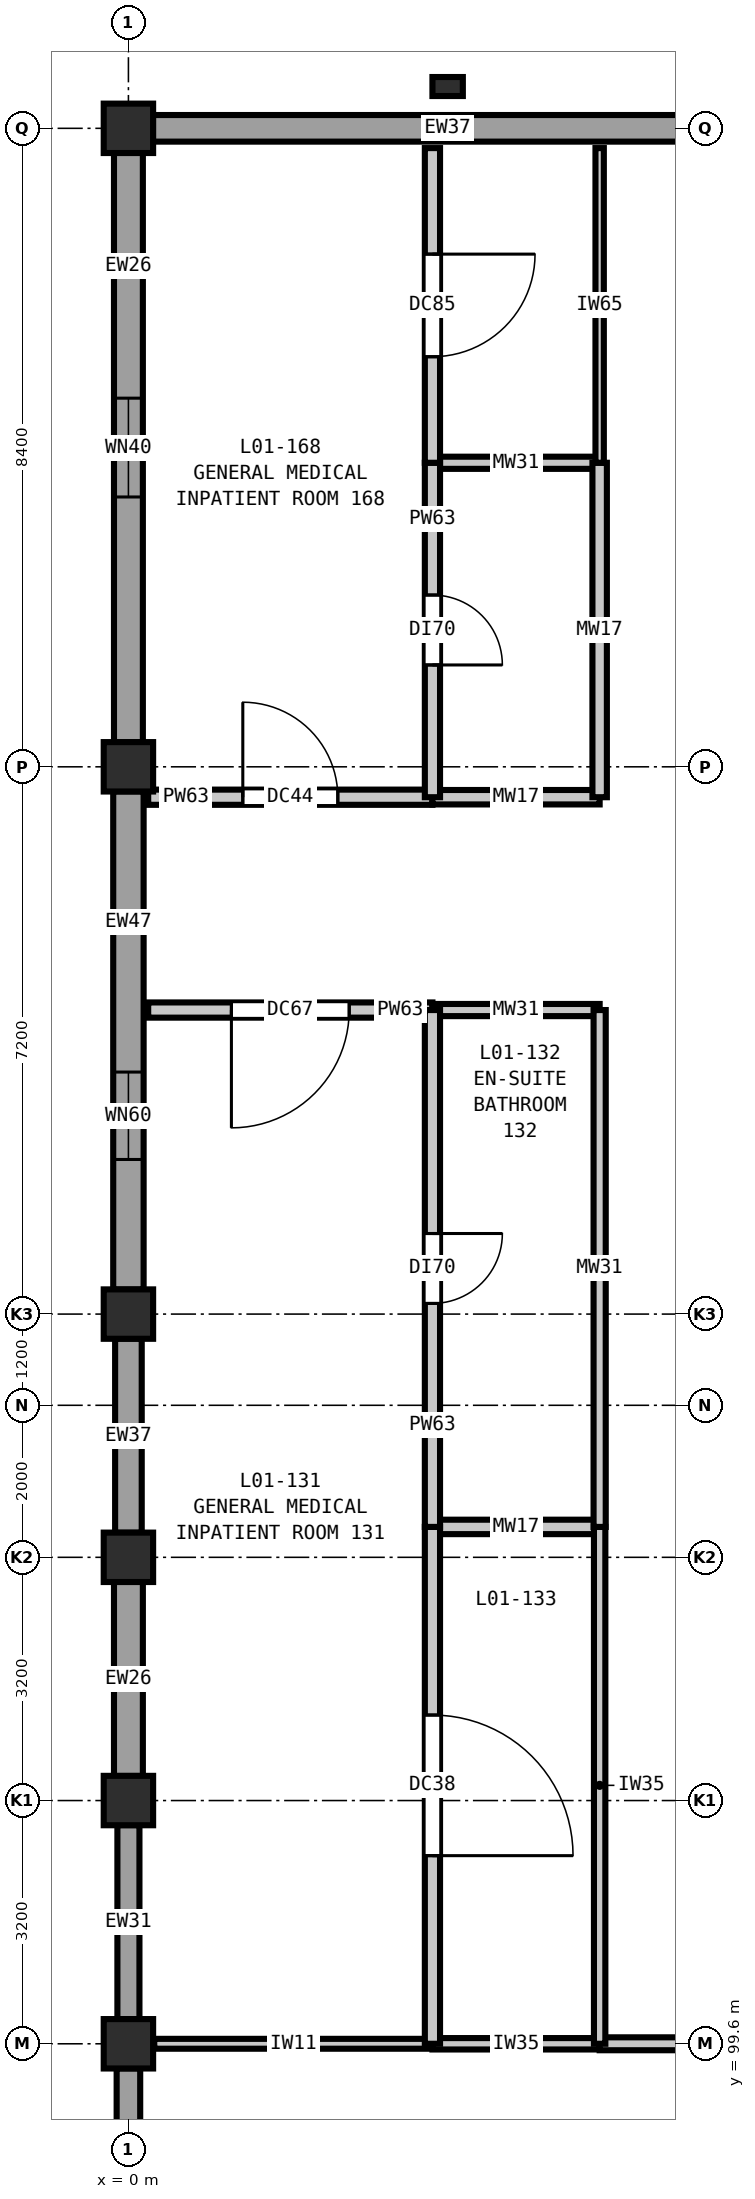
"""IFC4 building model, lengths in metres.
Left out: names, types, materials, properties, quantities, classifications, styles, units other than length and angle.
Written with IfcOpenShell. Run it as: python <this file> out.ifc"""

import sys

from ifc_helpers import new_model, si_unit, direction, frame, frame_2d, origin, origin_2d, place, context, subcontext, project, spatial, rectangle, extrude, element, fill, save


model = new_model("IFC4")
c1 = context("Model", 3, precision=1e-05, world=origin(), true_north=direction((0.0, 1.0)))
c2 = subcontext(c1, "Body", "Model", "MODEL_VIEW")
j1 = project(units=[si_unit("LENGTHUNIT", "METRE"), si_unit("PLANEANGLEUNIT", "RADIAN")], contexts=[c1])
p1 = place(None, origin())
s1 = spatial("IfcSite", under=j1, at=p1, CompositionType="ELEMENT")
p2 = place(p1, origin())
s2 = spatial("IfcBuilding", under=s1, at=p2, CompositionType="ELEMENT")
p3 = place(p2, frame((0.0, 0.0, 5.4)))
s3 = spatial("IfcBuildingStorey", under=s2, at=p3, CompositionType="ELEMENT", Elevation=5.4)
for number, where, z_axis, x_axis in (
    (1, (0.0, 99.6, 0.0), (0.0, 0.0, 1.0), (1.0, 0.0, 0.0)),
    (2, (0.0, 102.8, 0.0), (0.0, 0.0, 1.0), (1.0, 0.0, 0.0)),
    (3, (0.0, 106.0, 0.0), (0.0, 0.0, 1.0), (1.0, 0.0, 0.0)),
    (4, (0.0, 109.2, 0.0), (0.0, 0.0, 1.0), (1.0, 0.0, 0.0)),
    (5, (0.0, 116.4, 0.0), (0.0, 0.0, 1.0), (1.0, 0.0, 0.0)),
    (6, (0.0, 124.8, 0.0), (0.0, 0.0, 1.0), (1.0, 0.0, 0.0)),
):
    element("IfcColumn", number, at=place(p3, frame(where, z_axis=z_axis, x_axis=x_axis)), inside=s3, PredefinedType="COLUMN", context=c2, shape_type="SweptSolid", body=[
        extrude(rectangle(XDim=0.65, YDim=0.65, at=origin_2d()), origin(), (0.0, 0.0, 1.0), 5.4),
    ])
p4 = place(p3, frame((4.2, 125.35, 0.0), z_axis=(0.0, 0.0, 1.0), x_axis=(1.0, 0.0, 0.0)))
e7 = element("IfcColumn", 7, at=p4, inside=s3, PredefinedType="PILASTER", context=c2, shape_type="SweptSolid", body=[
    extrude(rectangle(XDim=0.4, YDim=0.25, at=origin_2d()), origin(), (0.0, 0.0, 1.0), 5.4),
])
p5 = place(p3, frame((0.0, 91.523, 0.0), z_axis=(0.0, 0.0, 1.0), x_axis=(0.0, 1.0, 0.0)))
e8 = element("IfcWall", 8, at=p5, inside=s3, PredefinedType="SOLIDWALL", context=c2, shape_type="SweptSolid", body=[
    extrude(rectangle(XDim=7.754, YDim=0.31, at=frame_2d((3.877, 0.0))), origin(), (0.0, 0.0, 1.0), 4.68),
])
p6 = place(p5, frame((2.089, 0.0, 0.9)))
e9 = element("IfcOpeningElement", 9, at=p6, cuts=e8, PredefinedType="OPENING", context=c2, shape_type="SweptSolid", body=[
    extrude(rectangle(XDim=1.0, YDim=1.75, at=frame_2d((0.5, 0.875))), frame((0.0, 0.165, 0.0), z_axis=(0.0, -1.0, 0.0), x_axis=(1.0, 0.0, 0.0)), (0.0, 0.0, 1.0), 0.33),
])
p7 = place(p3, frame((0.0, 99.923, 0.0), z_axis=(0.0, 0.0, 1.0), x_axis=(0.0, 1.0, 0.0)))
e10 = element("IfcWall", 10, at=p7, inside=s3, PredefinedType="SOLIDWALL", context=c2, shape_type="SweptSolid", body=[
    extrude(rectangle(XDim=2.554, YDim=0.29, at=frame_2d((1.277, 0.0))), origin(), (0.0, 0.0, 1.0), 4.68),
])
p8 = place(p3, frame((0.0, 103.123, 0.0), z_axis=(0.0, 0.0, 1.0), x_axis=(0.0, 1.0, 0.0)))
e11 = element("IfcWall", 11, at=p8, inside=s3, PredefinedType="SOLIDWALL", context=c2, shape_type="SweptSolid", body=[
    extrude(rectangle(XDim=2.554, YDim=0.38, at=frame_2d((1.277, 0.0))), origin(), (0.0, 0.0, 1.0), 4.68),
])
p9 = place(p3, frame((0.0, 106.323, 0.0), z_axis=(0.0, 0.0, 1.0), x_axis=(0.0, 1.0, 0.0)))
e12 = element("IfcWall", 12, at=p9, inside=s3, PredefinedType="SOLIDWALL", context=c2, shape_type="SweptSolid", body=[
    extrude(rectangle(XDim=2.554, YDim=0.35, at=frame_2d((1.277, 0.0))), origin(), (0.0, 0.0, 1.0), 4.68),
])
p10 = place(p3, frame((0.0, 109.523, 0.0), z_axis=(0.0, 0.0, 1.0), x_axis=(0.0, 1.0, 0.0)))
e13 = element("IfcWall", 13, at=p10, inside=s3, PredefinedType="SOLIDWALL", context=c2, shape_type="SweptSolid", body=[
    extrude(rectangle(XDim=6.554, YDim=0.4, at=frame_2d((3.277, 0.0))), origin(), (0.0, 0.0, 1.0), 4.68),
])
p11 = place(p10, frame((1.711, 0.0, 0.9)))
e14 = element("IfcOpeningElement", 14, at=p11, cuts=e13, PredefinedType="OPENING", context=c2, shape_type="SweptSolid", body=[
    extrude(rectangle(XDim=1.15, YDim=1.75, at=frame_2d((0.575, 0.875))), frame((0.0, 0.21, 0.0), z_axis=(0.0, -1.0, 0.0), x_axis=(1.0, 0.0, 0.0)), (0.0, 0.0, 1.0), 0.42),
])
p12 = place(p3, frame((0.0, 116.723, 0.0), z_axis=(0.0, 0.0, 1.0), x_axis=(0.0, 1.0, 0.0)))
e15 = element("IfcWall", 15, at=p12, inside=s3, PredefinedType="SOLIDWALL", context=c2, shape_type="SweptSolid", body=[
    extrude(rectangle(XDim=7.754, YDim=0.38, at=frame_2d((3.877, 0.0))), origin(), (0.0, 0.0, 1.0), 4.68),
])
p13 = place(p12, frame((3.227, 0.0, 0.9)))
e16 = element("IfcOpeningElement", 16, at=p13, cuts=e15, PredefinedType="OPENING", context=c2, shape_type="SweptSolid", body=[
    extrude(rectangle(XDim=1.3, YDim=1.75, at=frame_2d((0.65, 0.875))), frame((0.0, 0.2, 0.0), z_axis=(0.0, -1.0, 0.0), x_axis=(1.0, 0.0, 0.0)), (0.0, 0.0, 1.0), 0.4),
])
p14 = place(p3, frame((0.323, 124.8, 0.0), z_axis=(0.0, 0.0, 1.0), x_axis=(1.0, 0.0, 0.0)))
e17 = element("IfcWall", 17, at=p14, inside=s3, PredefinedType="SOLIDWALL", context=c2, shape_type="SweptSolid", body=[
    extrude(rectangle(XDim=7.754, YDim=0.35, at=frame_2d((3.877, 0.0))), origin(), (0.0, 0.0, 1.0), 4.68),
])
p15 = place(p3, frame((0.34, 99.6, 0.0), z_axis=(0.0, 0.0, 1.0), x_axis=(1.0, 0.0, 0.0)))
e18 = element("IfcWall", 18, at=p15, inside=s3, PredefinedType="PARTITIONING", context=c2, shape_type="SweptSolid", body=[
    extrude(rectangle(XDim=3.66, YDim=0.13, at=frame_2d((1.83, 0.0))), origin(), (0.0, 0.0, 1.0), 4.685),
])
p16 = place(p3, frame((4.0, 99.6, 0.0), z_axis=(0.0, 0.0, 1.0), x_axis=(1.0, 0.0, 0.0)))
e19 = element("IfcWall", 19, at=p16, inside=s3, PredefinedType="PARTITIONING", context=c2, shape_type="SweptSolid", body=[
    extrude(rectangle(XDim=2.2, YDim=0.15, at=frame_2d((1.1, 0.0))), origin(), (0.0, 0.0, 1.0), 4.685),
])
p17 = place(p3, frame((6.2, 99.6, 0.0), z_axis=(0.0, 0.0, 1.0), x_axis=(1.0, 0.0, 0.0)))
e20 = element("IfcWall", 20, at=p17, inside=s3, PredefinedType="PARTITIONING", context=c2, shape_type="SweptSolid", body=[
    extrude(rectangle(XDim=1.86, YDim=0.17, at=frame_2d((0.93, 0.0))), origin(), (0.0, 0.0, 1.0), 4.685),
])
p18 = place(p3, frame((4.0, 106.4, 0.0), z_axis=(0.0, 0.0, 1.0), x_axis=(1.0, 0.0, 0.0)))
e21 = element("IfcWall", 21, at=p18, inside=s3, PredefinedType="PLUMBINGWALL", context=c2, shape_type="SweptSolid", body=[
    extrude(rectangle(XDim=2.2, YDim=0.19, at=frame_2d((1.1, 0.0))), origin(), (0.0, 0.0, 1.0), 5.05),
])
p19 = place(p3, frame((0.26, 113.2, 0.0), z_axis=(0.0, 0.0, 1.0), x_axis=(1.0, 0.0, 0.0)))
e22 = element("IfcWall", 22, at=p19, inside=s3, PredefinedType="PARTITIONING", context=c2, shape_type="SweptSolid", body=[
    extrude(rectangle(XDim=3.74, YDim=0.2, at=frame_2d((1.87, 0.0))), origin(), (0.0, 0.0, 1.0), 5.05),
])
p20 = place(p19, frame((1.095, 0.0, 0.0)))
e23 = element("IfcOpeningElement", 23, at=p20, cuts=e22, PredefinedType="OPENING", context=c2, shape_type="SweptSolid", body=[
    extrude(rectangle(XDim=1.55, YDim=2.25, at=frame_2d((0.775, 1.125))), frame((0.0, 0.11, 0.0), z_axis=(0.0, -1.0, 0.0), x_axis=(1.0, 0.0, 0.0)), (0.0, 0.0, 1.0), 0.22),
])
p21 = place(p3, frame((4.0, 113.2, 0.0), z_axis=(0.0, 0.0, 1.0), x_axis=(1.0, 0.0, 0.0)))
e24 = element("IfcWall", 24, at=p21, inside=s3, PredefinedType="PLUMBINGWALL", context=c2, shape_type="SweptSolid", body=[
    extrude(rectangle(XDim=2.2, YDim=0.16, at=frame_2d((1.1, 0.0))), origin(), (0.0, 0.0, 1.0), 5.05),
])
p22 = place(p3, frame((0.26, 116.0, 0.0), z_axis=(0.0, 0.0, 1.0), x_axis=(1.0, 0.0, 0.0)))
e25 = element("IfcWall", 25, at=p22, inside=s3, PredefinedType="PARTITIONING", context=c2, shape_type="SweptSolid", body=[
    extrude(rectangle(XDim=3.74, YDim=0.2, at=frame_2d((1.87, 0.0))), origin(), (0.0, 0.0, 1.0), 5.05),
])
p23 = place(p22, frame((1.245, 0.0, 0.0)))
e26 = element("IfcOpeningElement", 26, at=p23, cuts=e25, PredefinedType="OPENING", context=c2, shape_type="SweptSolid", body=[
    extrude(rectangle(XDim=1.25, YDim=2.15, at=frame_2d((0.625, 1.075))), frame((0.0, 0.11, 0.0), z_axis=(0.0, -1.0, 0.0), x_axis=(1.0, 0.0, 0.0)), (0.0, 0.0, 1.0), 0.22),
])
p24 = place(p3, frame((4.0, 116.0, 0.0), z_axis=(0.0, 0.0, 1.0), x_axis=(1.0, 0.0, 0.0)))
e27 = element("IfcWall", 27, at=p24, inside=s3, PredefinedType="PLUMBINGWALL", context=c2, shape_type="SweptSolid", body=[
    extrude(rectangle(XDim=2.2, YDim=0.19, at=frame_2d((1.1, 0.0))), origin(), (0.0, 0.0, 1.0), 5.05),
])
p25 = place(p3, frame((4.0, 120.4, 0.0), z_axis=(0.0, 0.0, 1.0), x_axis=(1.0, 0.0, 0.0)))
e28 = element("IfcWall", 28, at=p25, inside=s3, PredefinedType="PLUMBINGWALL", context=c2, shape_type="SweptSolid", body=[
    extrude(rectangle(XDim=2.2, YDim=0.16, at=frame_2d((1.1, 0.0))), origin(), (0.0, 0.0, 1.0), 5.05),
])
p26 = place(p3, frame((4.0, 99.6, 0.0), z_axis=(0.0, 0.0, 1.0), x_axis=(0.0, 1.0, 0.0)))
e29 = element("IfcWall", 29, at=p26, inside=s3, PredefinedType="PARTITIONING", context=c2, shape_type="SweptSolid", body=[
    extrude(rectangle(XDim=6.8, YDim=0.2, at=frame_2d((3.4, 0.0))), origin(), (0.0, 0.0, 1.0), 5.05),
])
p27 = place(p26, frame((2.475, 0.0, 0.0)))
e30 = element("IfcOpeningElement", 30, at=p27, cuts=e29, PredefinedType="OPENING", context=c2, shape_type="SweptSolid", body=[
    extrude(rectangle(XDim=1.85, YDim=2.3, at=frame_2d((0.925, 1.15))), frame((0.0, 0.11, 0.0), z_axis=(0.0, -1.0, 0.0), x_axis=(1.0, 0.0, 0.0)), (0.0, 0.0, 1.0), 0.22),
])
p28 = place(p3, frame((4.0, 106.4, 0.0), z_axis=(0.0, 0.0, 1.0), x_axis=(0.0, 1.0, 0.0)))
e31 = element("IfcWall", 31, at=p28, inside=s3, PredefinedType="PARTITIONING", context=c2, shape_type="SweptSolid", body=[
    extrude(rectangle(XDim=6.8, YDim=0.2, at=frame_2d((3.4, 0.0))), origin(), (0.0, 0.0, 1.0), 5.05),
])
p29 = place(p28, frame((2.94, 0.0, 0.0)))
e32 = element("IfcOpeningElement", 32, at=p29, cuts=e31, PredefinedType="OPENING", context=c2, shape_type="SweptSolid", body=[
    extrude(rectangle(XDim=0.92, YDim=2.1, at=frame_2d((0.46, 1.05))), frame((0.0, 0.11, 0.0), z_axis=(0.0, -1.0, 0.0), x_axis=(1.0, 0.0, 0.0)), (0.0, 0.0, 1.0), 0.22),
])
p30 = place(p3, frame((4.0, 116.0, 0.0), z_axis=(0.0, 0.0, 1.0), x_axis=(0.0, 1.0, 0.0)))
e33 = element("IfcWall", 33, at=p30, inside=s3, PredefinedType="PARTITIONING", context=c2, shape_type="SweptSolid", body=[
    extrude(rectangle(XDim=4.4, YDim=0.2, at=frame_2d((2.2, 0.0))), origin(), (0.0, 0.0, 1.0), 5.05),
])
p31 = place(p30, frame((1.74, 0.0, 0.0)))
e34 = element("IfcOpeningElement", 34, at=p31, cuts=e33, PredefinedType="OPENING", context=c2, shape_type="SweptSolid", body=[
    extrude(rectangle(XDim=0.92, YDim=2.1, at=frame_2d((0.46, 1.05))), frame((0.0, 0.11, 0.0), z_axis=(0.0, -1.0, 0.0), x_axis=(1.0, 0.0, 0.0)), (0.0, 0.0, 1.0), 0.22),
])
p32 = place(p3, frame((4.0, 120.4, 0.0), z_axis=(0.0, 0.0, 1.0), x_axis=(0.0, 1.0, 0.0)))
e35 = element("IfcWall", 35, at=p32, inside=s3, PredefinedType="PARTITIONING", context=c2, shape_type="SweptSolid", body=[
    extrude(rectangle(XDim=4.14, YDim=0.2, at=frame_2d((2.07, 0.0))), origin(), (0.0, 0.0, 1.0), 5.05),
])
p33 = place(p32, frame((1.395, 0.0, 0.0)))
e36 = element("IfcOpeningElement", 36, at=p33, cuts=e35, PredefinedType="OPENING", context=c2, shape_type="SweptSolid", body=[
    extrude(rectangle(XDim=1.35, YDim=2.2, at=frame_2d((0.675, 1.1))), frame((0.0, 0.11, 0.0), z_axis=(0.0, -1.0, 0.0), x_axis=(1.0, 0.0, 0.0)), (0.0, 0.0, 1.0), 0.22),
])
p34 = place(p3, frame((6.2, 99.6, 0.0), z_axis=(0.0, 0.0, 1.0), x_axis=(0.0, 1.0, 0.0)))
e37 = element("IfcWall", 37, at=p34, inside=s3, PredefinedType="PARTITIONING", context=c2, shape_type="SweptSolid", body=[
    extrude(rectangle(XDim=6.8, YDim=0.15, at=frame_2d((3.4, 0.0))), origin(), (0.0, 0.0, 1.0), 5.05),
])
p35 = place(p3, frame((6.2, 106.4, 0.0), z_axis=(0.0, 0.0, 1.0), x_axis=(0.0, 1.0, 0.0)))
e38 = element("IfcWall", 38, at=p35, inside=s3, PredefinedType="PLUMBINGWALL", context=c2, shape_type="SweptSolid", body=[
    extrude(rectangle(XDim=6.8, YDim=0.16, at=frame_2d((3.4, 0.0))), origin(), (0.0, 0.0, 1.0), 5.05),
])
p36 = place(p3, frame((6.2, 116.0, 0.0), z_axis=(0.0, 0.0, 1.0), x_axis=(0.0, 1.0, 0.0)))
e39 = element("IfcWall", 39, at=p36, inside=s3, PredefinedType="PLUMBINGWALL", context=c2, shape_type="SweptSolid", body=[
    extrude(rectangle(XDim=4.4, YDim=0.19, at=frame_2d((2.2, 0.0))), origin(), (0.0, 0.0, 1.0), 5.05),
])
p37 = place(p3, frame((6.2, 120.4, 0.0), z_axis=(0.0, 0.0, 1.0), x_axis=(0.0, 1.0, 0.0)))
e40 = element("IfcWall", 40, at=p37, inside=s3, PredefinedType="PARTITIONING", context=c2, shape_type="SweptSolid", body=[
    extrude(rectangle(XDim=4.14, YDim=0.11, at=frame_2d((2.07, 0.0))), origin(), (0.0, 0.0, 1.0), 5.05),
])
p38 = place(p11, origin())
e41 = element("IfcWindow", 41, at=p38, inside=s3, PartitioningType="SINGLE_PANEL", PredefinedType="WINDOW", context=c2, shape_type="SweptSolid", body=[
    extrude(rectangle(XDim=1.15, YDim=1.75, at=frame_2d((0.575, 0.875))), frame((0.0, 0.03, 0.0), z_axis=(0.0, -1.0, 0.0), x_axis=(1.0, 0.0, 0.0)), (0.0, 0.0, 1.0), 0.06),
])
fill(e14, e41)
p39 = place(p13, origin())
e42 = element("IfcWindow", 42, at=p39, inside=s3, PartitioningType="SINGLE_PANEL", PredefinedType="WINDOW", context=c2, shape_type="SweptSolid", body=[
    extrude(rectangle(XDim=1.3, YDim=1.75, at=frame_2d((0.65, 0.875))), frame((0.0, 0.03, 0.0), z_axis=(0.0, -1.0, 0.0), x_axis=(1.0, 0.0, 0.0)), (0.0, 0.0, 1.0), 0.06),
])
fill(e16, e42)
p40 = place(p20, frame((1.55, 0.0, 0.0), z_axis=(0.0, 0.0, 1.0), x_axis=(-1.0, 0.0, 0.0)))
e43 = element("IfcDoor", 43, at=p40, inside=s3, OperationType="SINGLE_SWING_RIGHT", PredefinedType="DOOR", context=c2, shape_type="SweptSolid", body=[
    extrude(rectangle(XDim=1.55, YDim=2.25, at=frame_2d((0.775, 1.125))), frame((0.0, 0.025, 0.0), z_axis=(0.0, -1.0, 0.0), x_axis=(1.0, 0.0, 0.0)), (0.0, 0.0, 1.0), 0.05),
])
fill(e23, e43)
p41 = place(p23, origin())
e44 = element("IfcDoor", 44, at=p41, inside=s3, OperationType="SINGLE_SWING_LEFT", PredefinedType="DOOR", context=c2, shape_type="SweptSolid", body=[
    extrude(rectangle(XDim=1.25, YDim=2.15, at=frame_2d((0.625, 1.075))), frame((0.0, 0.025, 0.0), z_axis=(0.0, -1.0, 0.0), x_axis=(1.0, 0.0, 0.0)), (0.0, 0.0, 1.0), 0.05),
])
fill(e26, e44)
p42 = place(p27, frame((1.85, 0.0, 0.0), z_axis=(0.0, 0.0, 1.0), x_axis=(-1.0, 0.0, 0.0)))
e45 = element("IfcDoor", 45, at=p42, inside=s3, OperationType="SINGLE_SWING_RIGHT", PredefinedType="DOOR", context=c2, shape_type="SweptSolid", body=[
    extrude(rectangle(XDim=1.85, YDim=2.3, at=frame_2d((0.925, 1.15))), frame((0.0, 0.025, 0.0), z_axis=(0.0, -1.0, 0.0), x_axis=(1.0, 0.0, 0.0)), (0.0, 0.0, 1.0), 0.05),
])
fill(e30, e45)
p43 = place(p29, frame((0.92, 0.0, 0.0), z_axis=(0.0, 0.0, 1.0), x_axis=(-1.0, 0.0, 0.0)))
e46 = element("IfcDoor", 46, at=p43, inside=s3, OperationType="SINGLE_SWING_LEFT", PredefinedType="DOOR", context=c2, shape_type="SweptSolid", body=[
    extrude(rectangle(XDim=0.92, YDim=2.1, at=frame_2d((0.46, 1.05))), frame((0.0, 0.025, 0.0), z_axis=(0.0, -1.0, 0.0), x_axis=(1.0, 0.0, 0.0)), (0.0, 0.0, 1.0), 0.05),
])
fill(e32, e46)
p44 = place(p31, frame((0.92, 0.0, 0.0), z_axis=(0.0, 0.0, 1.0), x_axis=(-1.0, 0.0, 0.0)))
e47 = element("IfcDoor", 47, at=p44, inside=s3, OperationType="SINGLE_SWING_RIGHT", PredefinedType="DOOR", context=c2, shape_type="SweptSolid", body=[
    extrude(rectangle(XDim=0.92, YDim=2.1, at=frame_2d((0.46, 1.05))), frame((0.0, 0.025, 0.0), z_axis=(0.0, -1.0, 0.0), x_axis=(1.0, 0.0, 0.0)), (0.0, 0.0, 1.0), 0.05),
])
fill(e34, e47)
p45 = place(p33, frame((1.35, 0.0, 0.0), z_axis=(0.0, 0.0, 1.0), x_axis=(-1.0, 0.0, 0.0)))
e48 = element("IfcDoor", 48, at=p45, inside=s3, OperationType="SINGLE_SWING_LEFT", PredefinedType="DOOR", context=c2, shape_type="SweptSolid", body=[
    extrude(rectangle(XDim=1.35, YDim=2.2, at=frame_2d((0.675, 1.1))), frame((0.0, 0.025, 0.0), z_axis=(0.0, -1.0, 0.0), x_axis=(1.0, 0.0, 0.0)), (0.0, 0.0, 1.0), 0.05),
])
fill(e36, e48)
save(model, sys.argv[1])
